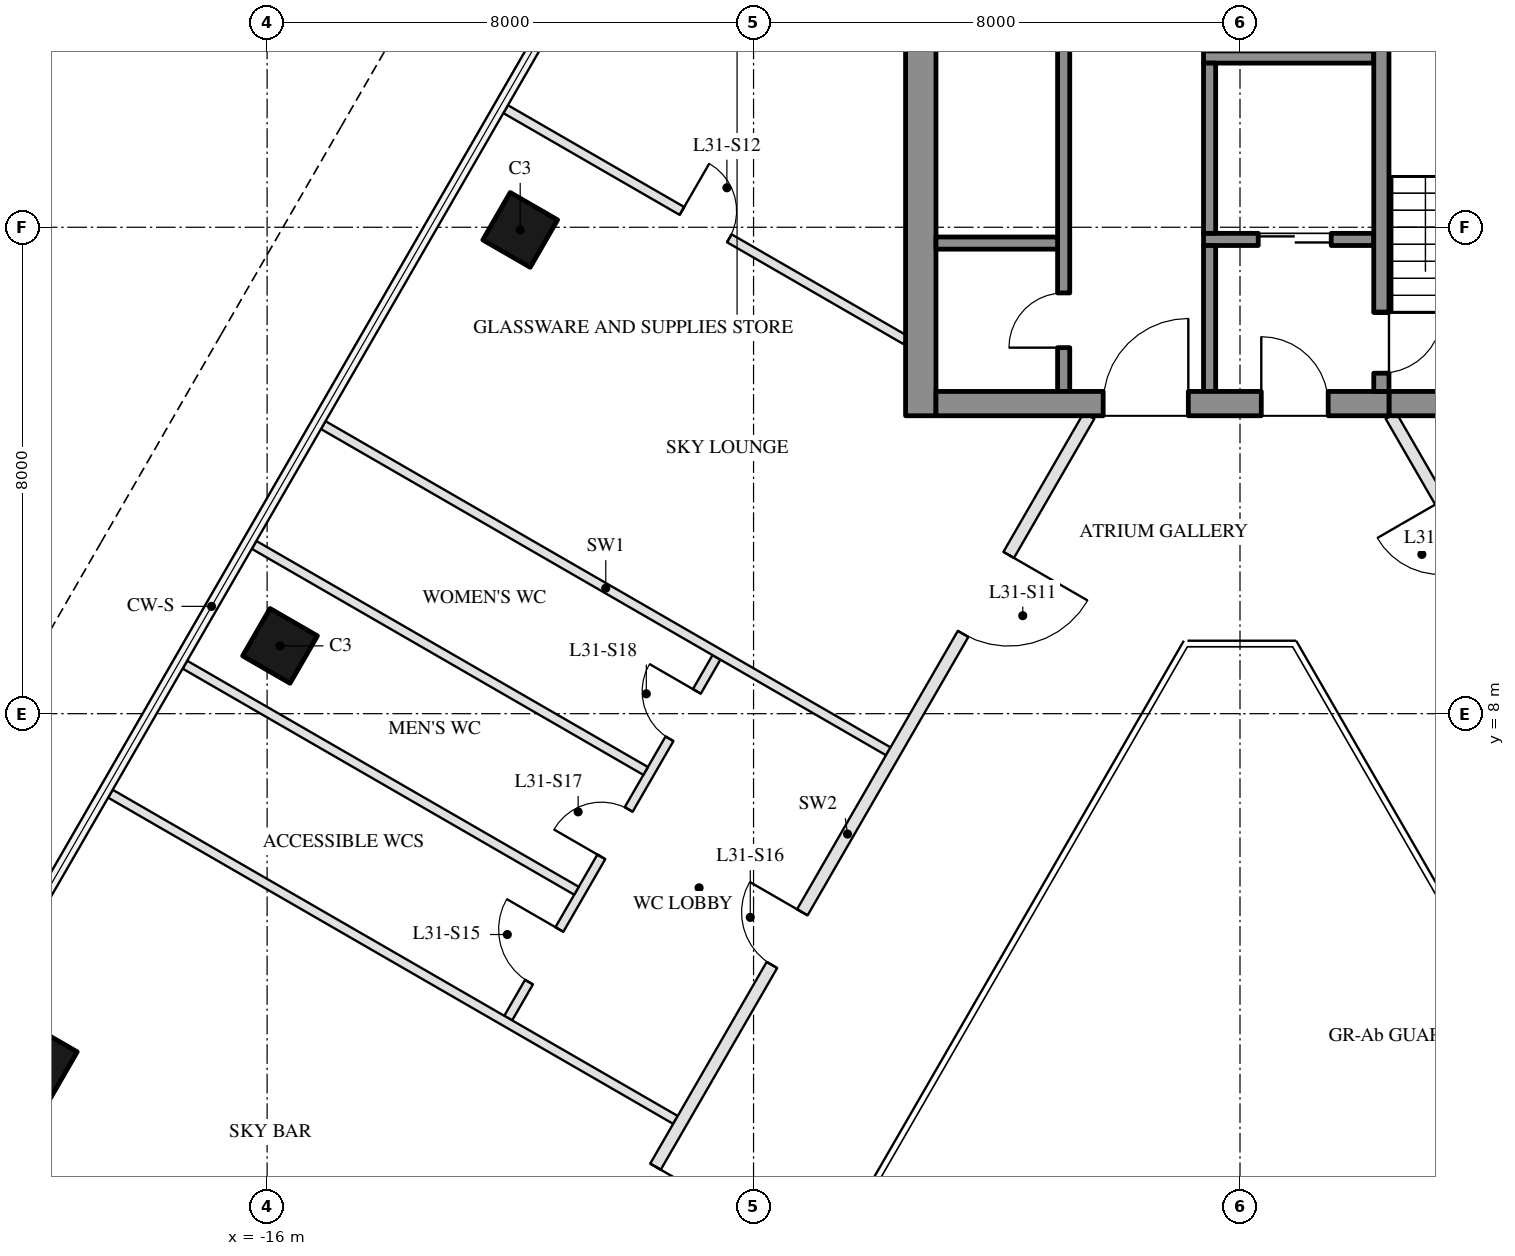
"""IFC4 building model, lengths in metres.
Left out: names, types, materials, properties, quantities, classifications, styles, units other than length and angle.
Written with IfcOpenShell. Run it as: python <this file> out.ifc"""

import sys

from ifc_helpers import new_model, si_unit, direction, frame, frame_2d, origin, origin_2d, place, context, subcontext, project, spatial, rectangle, hollow_rectangle, extrude, element, fill, save


model = new_model("IFC4")
c1 = context("Model", 3, precision=1e-05, world=origin(), true_north=direction((0.0, 1.0)))
c2 = subcontext(c1, "Body", "Model", "MODEL_VIEW")
j1 = project(units=[si_unit("LENGTHUNIT", "METRE"), si_unit("PLANEANGLEUNIT", "RADIAN")], contexts=[c1])
p1 = place(None, origin())
s1 = spatial("IfcSite", under=j1, at=p1, CompositionType="ELEMENT")
p2 = place(p1, origin())
s2 = spatial("IfcBuilding", under=s1, at=p2, CompositionType="ELEMENT")
p3 = place(p2, frame((0.0, 0.0, 131.6)))
s3 = spatial("IfcBuildingStorey", under=s2, at=p3, CompositionType="ELEMENT", Elevation=131.6)
for number, where, z_axis, x_axis in (
    (1, (-11.838, 15.957, 0.0), (0.0, 0.0, 1.0), (0.5, 0.866, 0.0)),
    (2, (-15.788, 9.115, 0.0), (0.0, 0.0, 1.0), (0.5, 0.866, 0.0)),
    (3, (-19.738, 2.273, 0.0), (0.0, 0.0, 1.0), (0.5, 0.866, 0.0)),
):
    element("IfcColumn", number, at=place(p3, frame(where, z_axis=z_axis, x_axis=x_axis)), inside=s3, PredefinedType="COLUMN", context=c2, shape_type="SweptSolid", body=[
        extrude(hollow_rectangle(XDim=0.9, YDim=0.9, WallThickness=0.04, at=origin_2d()), origin(), (0.0, 0.0, 1.0), 6.0),
    ])
p4 = place(p3, frame((-5.25, 12.9, 0.0), z_axis=(0.0, 0.0, 1.0), x_axis=(0.0, 1.0, 0.0)))
e4 = element("IfcWall", 4, at=p4, inside=s3, PredefinedType="SHEAR", context=c2, shape_type="SweptSolid", body=[
    extrude(rectangle(XDim=14.837, YDim=0.5, at=frame_2d((7.418, 0.0))), origin(), (0.0, 0.0, 1.0), 5.7),
])
p5 = place(p3, frame((2.2, 18.8, 0.0), z_axis=(0.0, 0.0, 1.0), x_axis=(-1.0, 0.0, 0.0)))
e5 = element("IfcWall", 5, at=p5, inside=s3, PredefinedType="SHEAR", context=c2, shape_type="SweptSolid", body=[
    extrude(rectangle(XDim=2.8, YDim=0.2, at=frame_2d((1.4, 0.0))), origin(), (0.0, 0.0, 1.0), 5.7),
])
p6 = place(p3, frame((2.2, 15.8, 0.0), z_axis=(0.0, 0.0, 1.0), x_axis=(-1.0, 0.0, 0.0)))
e6 = element("IfcWall", 6, at=p6, inside=s3, PredefinedType="SHEAR", context=c2, shape_type="SweptSolid", body=[
    extrude(rectangle(XDim=2.8, YDim=0.2, at=frame_2d((1.4, 0.0))), origin(), (0.0, 0.0, 1.0), 5.7),
])
p7 = place(p6, frame((0.7, 0.0, 0.0)))
e7 = element("IfcOpeningElement", 7, at=p7, cuts=e6, PredefinedType="OPENING", context=c2, shape_type="SweptSolid", body=[
    extrude(rectangle(XDim=1.2, YDim=2.1, at=frame_2d((0.6, 1.05))), frame((0.0, 0.11, 0.0), z_axis=(0.0, -1.0, 0.0), x_axis=(1.0, 0.0, 0.0)), (0.0, 0.0, 1.0), 0.22),
])
p8 = place(p3, frame((-0.5, 15.9, 0.0), z_axis=(0.0, 0.0, 1.0), x_axis=(0.0, 1.0, 0.0)))
e8 = element("IfcWall", 8, at=p8, inside=s3, PredefinedType="SHEAR", context=c2, shape_type="SweptSolid", body=[
    extrude(rectangle(XDim=2.8, YDim=0.2, at=frame_2d((1.4, 0.0))), origin(), (0.0, 0.0, 1.0), 5.7),
])
p9 = place(p3, frame((-0.5, 13.3, 0.0), z_axis=(0.0, 0.0, 1.0), x_axis=(0.0, 1.0, 0.0)))
e9 = element("IfcWall", 9, at=p9, inside=s3, PredefinedType="SHEAR", context=c2, shape_type="SweptSolid", body=[
    extrude(rectangle(XDim=2.4, YDim=0.2, at=frame_2d((1.2, 0.0))), origin(), (0.0, 0.0, 1.0), 5.7),
])
p10 = place(p3, frame((-2.9, 13.3, 0.0), z_axis=(0.0, 0.0, 1.0), x_axis=(0.0, 1.0, 0.0)))
e10 = element("IfcWall", 10, at=p10, inside=s3, PredefinedType="SHEAR", context=c2, shape_type="SweptSolid", body=[
    extrude(rectangle(XDim=12.6, YDim=0.2, at=frame_2d((6.3, 0.0))), origin(), (0.0, 0.0, 1.0), 5.7),
])
p11 = place(p10, frame((0.72, 0.0, 0.0)))
e11 = element("IfcOpeningElement", 11, at=p11, cuts=e10, PredefinedType="OPENING", context=c2, shape_type="SweptSolid", body=[
    extrude(rectangle(XDim=0.9, YDim=2.1, at=frame_2d((0.45, 1.05))), frame((0.0, 0.11, 0.0), z_axis=(0.0, -1.0, 0.0), x_axis=(1.0, 0.0, 0.0)), (0.0, 0.0, 1.0), 0.22),
])
p12 = place(p10, frame((5.8, 0.0, 0.0)))
e12 = element("IfcOpeningElement", 12, at=p12, cuts=e10, PredefinedType="OPENING", context=c2, shape_type="SweptSolid", body=[
    extrude(rectangle(XDim=0.9, YDim=2.1, at=frame_2d((0.45, 1.05))), frame((0.0, 0.11, 0.0), z_axis=(0.0, -1.0, 0.0), x_axis=(1.0, 0.0, 0.0)), (0.0, 0.0, 1.0), 0.22),
])
p13 = place(p10, frame((10.51, 0.0, 0.0)))
e13 = element("IfcOpeningElement", 13, at=p13, cuts=e10, PredefinedType="OPENING", context=c2, shape_type="SweptSolid", body=[
    extrude(rectangle(XDim=0.9, YDim=2.1, at=frame_2d((0.45, 1.05))), frame((0.0, 0.11, 0.0), z_axis=(0.0, -1.0, 0.0), x_axis=(1.0, 0.0, 0.0)), (0.0, 0.0, 1.0), 0.22),
])
p14 = place(p3, frame((-3.0, 15.74, 0.0), z_axis=(0.0, 0.0, 1.0), x_axis=(-1.0, 0.0, 0.0)))
e14 = element("IfcWall", 14, at=p14, inside=s3, PredefinedType="SHEAR", context=c2, shape_type="SweptSolid", body=[
    extrude(rectangle(XDim=2.0, YDim=0.2, at=frame_2d((1.0, 0.0))), origin(), (0.0, 0.0, 1.0), 5.7),
])
p15 = place(p3, frame((5.0, 13.1, 0.0), z_axis=(0.0, 0.0, 1.0), x_axis=(-1.0, 0.0, 0.0)))
e15 = element("IfcWall", 15, at=p15, inside=s3, PredefinedType="SHEAR", context=c2, shape_type="SweptSolid", body=[
    extrude(rectangle(XDim=2.55, YDim=0.4, at=frame_2d((1.275, 0.0))), origin(), (0.0, 0.0, 1.0), 5.7),
])
p16 = place(p3, frame((2.45, 13.1, 0.0), z_axis=(0.0, 0.0, 1.0), x_axis=(-1.0, 0.0, 0.0)))
e16 = element("IfcWall", 16, at=p16, inside=s3, PredefinedType="SHEAR", context=c2, shape_type="SweptSolid", body=[
    extrude(rectangle(XDim=7.45, YDim=0.4, at=frame_2d((3.725, 0.0))), origin(), (0.0, 0.0, 1.0), 5.7),
])
p17 = place(p16, frame((1.0, 0.0, 0.0)))
e17 = element("IfcOpeningElement", 17, at=p17, cuts=e16, PredefinedType="OPENING", context=c2, shape_type="SweptSolid", body=[
    extrude(rectangle(XDim=1.1, YDim=2.1, at=frame_2d((0.55, 1.05))), frame((0.0, 0.21, 0.0), z_axis=(0.0, -1.0, 0.0), x_axis=(1.0, 0.0, 0.0)), (0.0, 0.0, 1.0), 0.42),
])
p18 = place(p16, frame((3.3, 0.0, 0.0)))
e18 = element("IfcOpeningElement", 18, at=p18, cuts=e16, PredefinedType="OPENING", context=c2, shape_type="SweptSolid", body=[
    extrude(rectangle(XDim=1.4, YDim=2.1, at=frame_2d((0.7, 1.05))), frame((0.0, 0.21, 0.0), z_axis=(0.0, -1.0, 0.0), x_axis=(1.0, 0.0, 0.0)), (0.0, 0.0, 1.0), 0.42),
])
p19 = place(p3, frame((2.325, 13.3, 0.0), z_axis=(0.0, 0.0, 1.0), x_axis=(0.0, 1.0, 0.0)))
e19 = element("IfcWall", 19, at=p19, inside=s3, PredefinedType="SHEAR", context=c2, shape_type="SweptSolid", body=[
    extrude(rectangle(XDim=1.306, YDim=0.25, at=frame_2d((0.653, 0.0))), origin(), (0.0, 0.0, 1.0), 5.7),
])
p20 = place(p19, frame((0.3, 0.0, 0.0)))
e20 = element("IfcOpeningElement", 20, at=p20, cuts=e19, PredefinedType="OPENING", context=c2, shape_type="SweptSolid", body=[
    extrude(rectangle(XDim=1.0, YDim=2.1, at=frame_2d((0.5, 1.05))), frame((0.0, 0.135, 0.0), z_axis=(0.0, -1.0, 0.0), x_axis=(1.0, 0.0, 0.0)), (0.0, 0.0, 1.0), 0.27),
])
p21 = place(p3, frame((2.325, 14.606, 0.0), z_axis=(0.0, 0.0, 1.0), x_axis=(0.0, 1.0, 0.0)))
e21 = element("IfcWall", 21, at=p21, inside=s3, PredefinedType="SHEAR", context=c2, shape_type="SweptSolid", body=[
    extrude(rectangle(XDim=5.144, YDim=0.25, at=frame_2d((2.572, 0.0))), origin(), (0.0, 0.0, 1.0), 5.7),
])
p22 = place(p3, frame((12.413, -4.3, 0.0), z_axis=(0.0, 0.0, 1.0), x_axis=(-0.50000478328, 0.866022642139, 0.0)))
e22 = element("IfcWall", 22, at=p22, inside=s3, PredefinedType="PARTITIONING", context=c2, shape_type="SweptSolid", body=[
    extrude(rectangle(XDim=19.861, YDim=0.2, at=frame_2d((9.931, 0.0))), origin(), (0.0, 0.0, 1.0), 4.91),
])
p23 = place(p22, frame((1.142, 0.0, 0.0)))
e23 = element("IfcOpeningElement", 23, at=p23, cuts=e22, PredefinedType="OPENING", context=c2, shape_type="SweptSolid", body=[
    extrude(rectangle(XDim=1.8, YDim=2.4, at=frame_2d((0.9, 1.2))), frame((0.0, 0.11, 0.0), z_axis=(0.0, -1.0, 0.0), x_axis=(1.0, 0.0, 0.0)), (0.0, 0.0, 1.0), 0.22),
])
p24 = place(p22, frame((4.325, 0.0, 0.0)))
e24 = element("IfcOpeningElement", 24, at=p24, cuts=e22, PredefinedType="OPENING", context=c2, shape_type="SweptSolid", body=[
    extrude(rectangle(XDim=1.8, YDim=2.4, at=frame_2d((0.9, 1.2))), frame((0.0, 0.11, 0.0), z_axis=(0.0, -1.0, 0.0), x_axis=(1.0, 0.0, 0.0)), (0.0, 0.0, 1.0), 0.22),
])
p25 = place(p22, frame((8.355, 0.0, 0.0)))
e25 = element("IfcOpeningElement", 25, at=p25, cuts=e22, PredefinedType="OPENING", context=c2, shape_type="SweptSolid", body=[
    extrude(rectangle(XDim=1.2, YDim=2.1, at=frame_2d((0.6, 1.05))), frame((0.0, 0.11, 0.0), z_axis=(0.0, -1.0, 0.0), x_axis=(1.0, 0.0, 0.0)), (0.0, 0.0, 1.0), 0.22),
])
p26 = place(p22, frame((12.573, 0.0, 0.0)))
e26 = element("IfcOpeningElement", 26, at=p26, cuts=e22, PredefinedType="OPENING", context=c2, shape_type="SweptSolid", body=[
    extrude(rectangle(XDim=1.2, YDim=2.1, at=frame_2d((0.6, 1.05))), frame((0.0, 0.11, 0.0), z_axis=(0.0, -1.0, 0.0), x_axis=(1.0, 0.0, 0.0)), (0.0, 0.0, 1.0), 0.22),
])
p27 = place(p22, frame((17.032, 0.0, 0.0)))
e27 = element("IfcOpeningElement", 27, at=p27, cuts=e22, PredefinedType="OPENING", context=c2, shape_type="SweptSolid", body=[
    extrude(rectangle(XDim=1.2, YDim=2.1, at=frame_2d((0.6, 1.05))), frame((0.0, 0.11, 0.0), z_axis=(0.0, -1.0, 0.0), x_axis=(1.0, 0.0, 0.0)), (0.0, 0.0, 1.0), 0.22),
])
p28 = place(p3, frame((-8.61, 8.926, 0.0), z_axis=(0.0, 0.0, 1.0), x_axis=(-0.500014519185, -0.866017020967, 0.0)))
e28 = element("IfcWall", 28, at=p28, inside=s3, PredefinedType="PARTITIONING", context=c2, shape_type="SweptSolid", body=[
    extrude(rectangle(XDim=6.85, YDim=0.15, at=frame_2d((3.425, 0.0))), origin(), (0.0, 0.0, 1.0), 5.01),
])
p29 = place(p28, frame((5.167, 0.0, 0.0)))
e29 = element("IfcOpeningElement", 29, at=p29, cuts=e28, PredefinedType="OPENING", context=c2, shape_type="SweptSolid", body=[
    extrude(rectangle(XDim=1.0, YDim=2.1, at=frame_2d((0.5, 1.05))), frame((0.0, 0.085, 0.0), z_axis=(0.0, -1.0, 0.0), x_axis=(1.0, 0.0, 0.0)), (0.0, 0.0, 1.0), 0.17),
])
p30 = place(p28, frame((2.887, 0.0, 0.0)))
e30 = element("IfcOpeningElement", 30, at=p30, cuts=e28, PredefinedType="OPENING", context=c2, shape_type="SweptSolid", body=[
    extrude(rectangle(XDim=0.9, YDim=2.1, at=frame_2d((0.45, 1.05))), frame((0.0, 0.085, 0.0), z_axis=(0.0, -1.0, 0.0), x_axis=(1.0, 0.0, 0.0)), (0.0, 0.0, 1.0), 0.17),
])
p31 = place(p28, frame((0.646, 0.0, 0.0)))
e31 = element("IfcOpeningElement", 31, at=p31, cuts=e28, PredefinedType="OPENING", context=c2, shape_type="SweptSolid", body=[
    extrude(rectangle(XDim=0.9, YDim=2.1, at=frame_2d((0.45, 1.05))), frame((0.0, 0.085, 0.0), z_axis=(0.0, -1.0, 0.0), x_axis=(1.0, 0.0, 0.0)), (0.0, 0.0, 1.0), 0.17),
])
p32 = place(p3, frame((-12.077, 17.942, 0.0), z_axis=(0.0, 0.0, 1.0), x_axis=(0.866028729371, -0.499994239872, 0.0)))
e32 = element("IfcWall", 32, at=p32, inside=s3, PredefinedType="PARTITIONING", context=c2, shape_type="SweptSolid", body=[
    extrude(rectangle(XDim=7.594, YDim=0.15, at=frame_2d((3.797, 0.0))), origin(), (0.0, 0.0, 1.0), 5.7),
])
p33 = place(p32, frame((3.347, 0.0, 0.0)))
e33 = element("IfcOpeningElement", 33, at=p33, cuts=e32, PredefinedType="OPENING", context=c2, shape_type="SweptSolid", body=[
    extrude(rectangle(XDim=0.9, YDim=2.1, at=frame_2d((0.45, 1.05))), frame((0.0, 0.085, 0.0), z_axis=(0.0, -1.0, 0.0), x_axis=(1.0, 0.0, 0.0)), (0.0, 0.0, 1.0), 0.17),
])
p34 = place(p3, frame((-15.077, 12.746, 0.0), z_axis=(0.0, 0.0, 1.0), x_axis=(0.866026447599, -0.499998192055, 0.0)))
e34 = element("IfcWall", 34, at=p34, inside=s3, PredefinedType="PARTITIONING", context=c2, shape_type="SweptSolid", body=[
    extrude(rectangle(XDim=10.73, YDim=0.15, at=frame_2d((5.365, 0.0))), origin(), (0.0, 0.0, 1.0), 5.7),
])
for number, where, z_axis, x_axis in (
    (35, (-16.214, 10.776, 0.0), (0.0, 0.0, 1.0), (0.866, -0.5, 0.0)),
    (36, (-17.352, 8.806, 0.0), (0.0, 0.0, 1.0), (0.866, -0.5, 0.0)),
):
    element("IfcWall", number, at=place(p3, frame(where, z_axis=z_axis, x_axis=x_axis)), inside=s3, PredefinedType="PARTITIONING", context=c2, shape_type="SweptSolid", body=[
        extrude(rectangle(XDim=7.436, YDim=0.15, at=frame_2d((3.718, 0.0))), origin(), (0.0, 0.0, 1.0), 5.7),
    ])
p35 = place(p3, frame((-18.577, 6.684, 0.0), z_axis=(0.0, 0.0, 1.0), x_axis=(0.866026447599, -0.499998192055, 0.0)))
e37 = element("IfcWall", 37, at=p35, inside=s3, PredefinedType="PARTITIONING", context=c2, shape_type="SweptSolid", body=[
    extrude(rectangle(XDim=10.73, YDim=0.15, at=frame_2d((5.365, 0.0))), origin(), (0.0, 0.0, 1.0), 5.7),
])
p36 = place(p3, frame((-2.482, 12.9, 0.0), z_axis=(0.0, 0.0, 1.0), x_axis=(-0.50000478328, -0.866022642139, 0.0)))
e38 = element("IfcWall", 38, at=p36, inside=s3, PredefinedType="PARTITIONING", context=c2, shape_type="SweptSolid", body=[
    extrude(rectangle(XDim=19.861, YDim=0.2, at=frame_2d((9.931, 0.0))), origin(), (0.0, 0.0, 1.0), 4.91),
])
p37 = place(p36, frame((2.643, 0.0, 0.0)))
e39 = element("IfcOpeningElement", 39, at=p37, cuts=e38, PredefinedType="OPENING", context=c2, shape_type="SweptSolid", body=[
    extrude(rectangle(XDim=1.5, YDim=2.1, at=frame_2d((0.75, 1.05))), frame((0.0, 0.11, 0.0), z_axis=(0.0, -1.0, 0.0), x_axis=(1.0, 0.0, 0.0)), (0.0, 0.0, 1.0), 0.22),
])
p38 = place(p36, frame((14.261, 0.0, 0.0)))
e40 = element("IfcOpeningElement", 40, at=p38, cuts=e38, PredefinedType="OPENING", context=c2, shape_type="SweptSolid", body=[
    extrude(rectangle(XDim=1.5, YDim=2.1, at=frame_2d((0.75, 1.05))), frame((0.0, 0.11, 0.0), z_axis=(0.0, -1.0, 0.0), x_axis=(1.0, 0.0, 0.0)), (0.0, 0.0, 1.0), 0.22),
])
p39 = place(p36, frame((17.394, 0.0, 0.0)))
e41 = element("IfcOpeningElement", 41, at=p39, cuts=e38, PredefinedType="OPENING", context=c2, shape_type="SweptSolid", body=[
    extrude(rectangle(XDim=1.5, YDim=2.1, at=frame_2d((0.75, 1.05))), frame((0.0, 0.11, 0.0), z_axis=(0.0, -1.0, 0.0), x_axis=(1.0, 0.0, 0.0)), (0.0, 0.0, 1.0), 0.22),
])
p40 = place(p36, frame((9.43, 0.0, 0.0)))
e42 = element("IfcOpeningElement", 42, at=p40, cuts=e38, PredefinedType="OPENING", context=c2, shape_type="SweptSolid", body=[
    extrude(rectangle(XDim=1.0, YDim=2.1, at=frame_2d((0.5, 1.05))), frame((0.0, 0.11, 0.0), z_axis=(0.0, -1.0, 0.0), x_axis=(1.0, 0.0, 0.0)), (0.0, 0.0, 1.0), 0.22),
])
p41 = place(p7, origin())
e43 = element("IfcDoor", 43, at=p41, inside=s3, OperationType="DOUBLE_DOOR_SLIDING", PredefinedType="DOOR", context=c2, shape_type="SweptSolid", body=[
    extrude(rectangle(XDim=1.2, YDim=2.1, at=frame_2d((0.6, 1.05))), frame((0.0, 0.025, 0.0), z_axis=(0.0, -1.0, 0.0), x_axis=(1.0, 0.0, 0.0)), (0.0, 0.0, 1.0), 0.05),
])
fill(e7, e43)
p42 = place(p11, origin())
e44 = element("IfcDoor", 44, at=p42, inside=s3, OperationType="SINGLE_SWING_LEFT", PredefinedType="DOOR", context=c2, shape_type="SweptSolid", body=[
    extrude(rectangle(XDim=0.9, YDim=2.1, at=frame_2d((0.45, 1.05))), frame((0.0, 0.025, 0.0), z_axis=(0.0, -1.0, 0.0), x_axis=(1.0, 0.0, 0.0)), (0.0, 0.0, 1.0), 0.05),
])
fill(e11, e44)
p43 = place(p17, frame((1.1, 0.0, 0.0), z_axis=(0.0, 0.0, 1.0), x_axis=(-1.0, 0.0, 0.0)))
e45 = element("IfcDoor", 45, at=p43, inside=s3, OperationType="SINGLE_SWING_LEFT", PredefinedType="DOOR", context=c2, shape_type="SweptSolid", body=[
    extrude(rectangle(XDim=1.1, YDim=2.1, at=frame_2d((0.55, 1.05))), frame((0.0, 0.025, 0.0), z_axis=(0.0, -1.0, 0.0), x_axis=(1.0, 0.0, 0.0)), (0.0, 0.0, 1.0), 0.05),
])
fill(e17, e45)
p44 = place(p18, frame((1.4, 0.0, 0.0), z_axis=(0.0, 0.0, 1.0), x_axis=(-1.0, 0.0, 0.0)))
e46 = element("IfcDoor", 46, at=p44, inside=s3, OperationType="DOUBLE_DOOR_SINGLE_SWING", PredefinedType="DOOR", context=c2, shape_type="SweptSolid", body=[
    extrude(rectangle(XDim=1.4, YDim=2.1, at=frame_2d((0.7, 1.05))), frame((0.0, 0.025, 0.0), z_axis=(0.0, -1.0, 0.0), x_axis=(1.0, 0.0, 0.0)), (0.0, 0.0, 1.0), 0.05),
])
fill(e18, e46)
p45 = place(p20, frame((1.0, 0.0, 0.0), z_axis=(0.0, 0.0, 1.0), x_axis=(-1.0, 0.0, 0.0)))
e47 = element("IfcDoor", 47, at=p45, inside=s3, OperationType="SINGLE_SWING_LEFT", PredefinedType="DOOR", context=c2, shape_type="SweptSolid", body=[
    extrude(rectangle(XDim=1.0, YDim=2.1, at=frame_2d((0.5, 1.05))), frame((0.0, 0.025, 0.0), z_axis=(0.0, -1.0, 0.0), x_axis=(1.0, 0.0, 0.0)), (0.0, 0.0, 1.0), 0.05),
])
fill(e20, e47)
p46 = place(p37, origin())
e48 = element("IfcDoor", 48, at=p46, inside=s3, OperationType="DOUBLE_DOOR_SINGLE_SWING", PredefinedType="DOOR", context=c2, shape_type="SweptSolid", body=[
    extrude(rectangle(XDim=1.5, YDim=2.1, at=frame_2d((0.75, 1.05))), frame((0.0, 0.025, 0.0), z_axis=(0.0, -1.0, 0.0), x_axis=(1.0, 0.0, 0.0)), (0.0, 0.0, 1.0), 0.05),
])
fill(e39, e48)
p47 = place(p33, origin())
e49 = element("IfcDoor", 49, at=p47, inside=s3, OperationType="SINGLE_SWING_LEFT", PredefinedType="DOOR", context=c2, shape_type="SweptSolid", body=[
    extrude(rectangle(XDim=0.9, YDim=2.1, at=frame_2d((0.45, 1.05))), frame((0.0, 0.025, 0.0), z_axis=(0.0, -1.0, 0.0), x_axis=(1.0, 0.0, 0.0)), (0.0, 0.0, 1.0), 0.05),
])
fill(e33, e49)
p48 = place(p38, origin())
e50 = element("IfcDoor", 50, at=p48, inside=s3, OperationType="DOUBLE_DOOR_SINGLE_SWING", PredefinedType="DOOR", context=c2, shape_type="SweptSolid", body=[
    extrude(rectangle(XDim=1.5, YDim=2.1, at=frame_2d((0.75, 1.05))), frame((0.0, 0.025, 0.0), z_axis=(0.0, -1.0, 0.0), x_axis=(1.0, 0.0, 0.0)), (0.0, 0.0, 1.0), 0.05),
])
fill(e40, e50)
p49 = place(p29, frame((1.0, 0.0, 0.0), z_axis=(0.0, 0.0, 1.0), x_axis=(-1.0, 0.0, 0.0)))
e51 = element("IfcDoor", 51, at=p49, inside=s3, OperationType="SINGLE_SWING_RIGHT", PredefinedType="DOOR", context=c2, shape_type="SweptSolid", body=[
    extrude(rectangle(XDim=1.0, YDim=2.1, at=frame_2d((0.5, 1.05))), frame((0.0, 0.025, 0.0), z_axis=(0.0, -1.0, 0.0), x_axis=(1.0, 0.0, 0.0)), (0.0, 0.0, 1.0), 0.05),
])
fill(e29, e51)
p50 = place(p40, frame((1.0, 0.0, 0.0), z_axis=(0.0, 0.0, 1.0), x_axis=(-1.0, 0.0, 0.0)))
e52 = element("IfcDoor", 52, at=p50, inside=s3, OperationType="SINGLE_SWING_RIGHT", PredefinedType="DOOR", context=c2, shape_type="SweptSolid", body=[
    extrude(rectangle(XDim=1.0, YDim=2.1, at=frame_2d((0.5, 1.05))), frame((0.0, 0.025, 0.0), z_axis=(0.0, -1.0, 0.0), x_axis=(1.0, 0.0, 0.0)), (0.0, 0.0, 1.0), 0.05),
])
fill(e42, e52)
p51 = place(p30, frame((0.9, 0.0, 0.0), z_axis=(0.0, 0.0, 1.0), x_axis=(-1.0, 0.0, 0.0)))
e53 = element("IfcDoor", 53, at=p51, inside=s3, OperationType="SINGLE_SWING_LEFT", PredefinedType="DOOR", context=c2, shape_type="SweptSolid", body=[
    extrude(rectangle(XDim=0.9, YDim=2.1, at=frame_2d((0.45, 1.05))), frame((0.0, 0.025, 0.0), z_axis=(0.0, -1.0, 0.0), x_axis=(1.0, 0.0, 0.0)), (0.0, 0.0, 1.0), 0.05),
])
fill(e30, e53)
p52 = place(p31, frame((0.9, 0.0, 0.0), z_axis=(0.0, 0.0, 1.0), x_axis=(-1.0, 0.0, 0.0)))
e54 = element("IfcDoor", 54, at=p52, inside=s3, OperationType="SINGLE_SWING_RIGHT", PredefinedType="DOOR", context=c2, shape_type="SweptSolid", body=[
    extrude(rectangle(XDim=0.9, YDim=2.1, at=frame_2d((0.45, 1.05))), frame((0.0, 0.025, 0.0), z_axis=(0.0, -1.0, 0.0), x_axis=(1.0, 0.0, 0.0)), (0.0, 0.0, 1.0), 0.05),
])
fill(e31, e54)
save(model, sys.argv[1])
